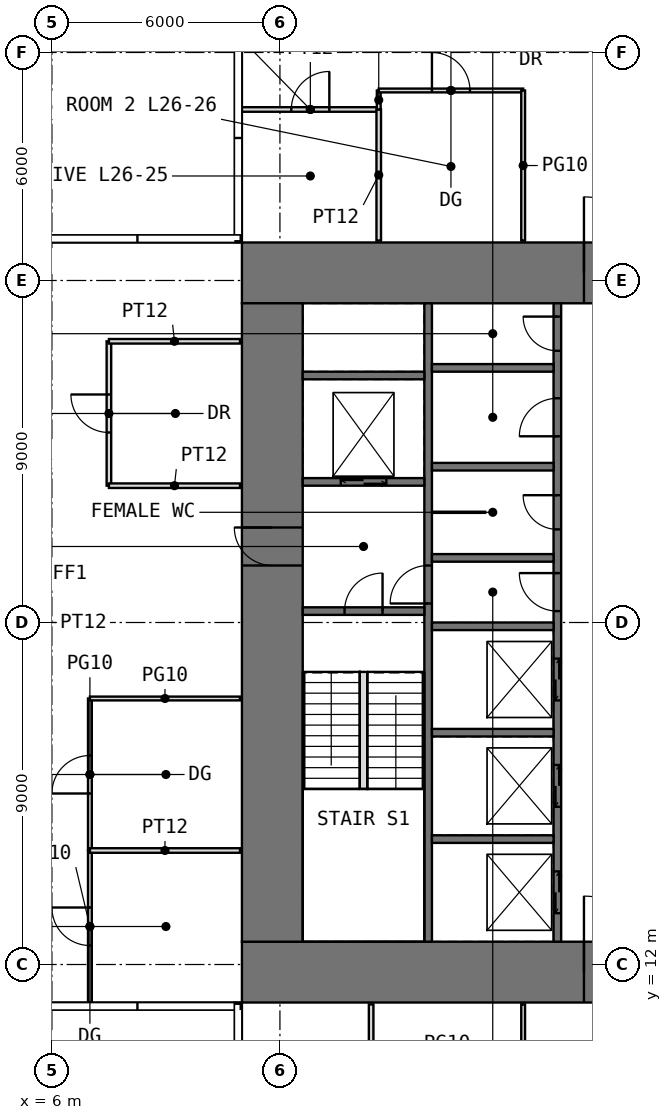
"""IFC4 building model, lengths in metres.
Left out: names, types, materials, properties, quantities, classifications, styles, units other than length and angle.
Written with IfcOpenShell. Run it as: python <this file> out.ifc"""

import sys

from ifc_helpers import new_model, si_unit, direction, frame, frame_2d, origin, place, context, subcontext, project, spatial, rectangle, extrude, element, fill, save


model = new_model("IFC4")
c1 = context("Model", 3, precision=1e-05, world=origin(), true_north=direction((0.0, 1.0)))
c2 = subcontext(c1, "Body", "Model", "MODEL_VIEW")
j1 = project(units=[si_unit("LENGTHUNIT", "METRE"), si_unit("PLANEANGLEUNIT", "RADIAN")], contexts=[c1])
p1 = place(None, origin())
s1 = spatial("IfcSite", under=j1, at=p1, CompositionType="ELEMENT")
p2 = place(p1, origin())
s2 = spatial("IfcBuilding", under=s1, at=p2, CompositionType="ELEMENT")
p3 = place(p2, frame((0.0, 0.0, 112.5)))
s3 = spatial("IfcBuildingStorey", under=s2, at=p3, CompositionType="ELEMENT", Elevation=112.5)
p4 = place(p3, frame((11.0, 11.8, -0.05), z_axis=(0.0, 0.0, 1.0), x_axis=(1.0, 0.0, 0.0)))
e1 = element("IfcWall", 1, at=p4, inside=s3, PredefinedType="SHEAR", context=c2, shape_type="SweptSolid", body=[
    extrude(rectangle(XDim=20.0, YDim=1.6, at=frame_2d((10.0, 0.0))), origin(), (0.0, 0.0, 1.0), 4.0),
])
p5 = place(p4, frame((9.0, 0.0, 0.05)))
e2 = element("IfcOpeningElement", 2, at=p5, cuts=e1, PredefinedType="OPENING", context=c2, shape_type="SweptSolid", body=[
    extrude(rectangle(XDim=2.0, YDim=2.2, at=frame_2d((1.0, 1.1))), frame((0.0, 0.81, 0.0), z_axis=(0.0, -1.0, 0.0), x_axis=(1.0, 0.0, 0.0)), (0.0, 0.0, 1.0), 1.62),
])
p6 = place(p3, frame((11.0, 30.2, -0.05), z_axis=(0.0, 0.0, 1.0), x_axis=(1.0, 0.0, 0.0)))
e3 = element("IfcWall", 3, at=p6, inside=s3, PredefinedType="SHEAR", context=c2, shape_type="SweptSolid", body=[
    extrude(rectangle(XDim=20.0, YDim=1.6, at=frame_2d((10.0, 0.0))), origin(), (0.0, 0.0, 1.0), 4.0),
])
p7 = place(p6, frame((9.0, 0.0, 0.05)))
e4 = element("IfcOpeningElement", 4, at=p7, cuts=e3, PredefinedType="OPENING", context=c2, shape_type="SweptSolid", body=[
    extrude(rectangle(XDim=2.0, YDim=2.2, at=frame_2d((1.0, 1.1))), frame((0.0, 0.81, 0.0), z_axis=(0.0, -1.0, 0.0), x_axis=(1.0, 0.0, 0.0)), (0.0, 0.0, 1.0), 1.62),
])
p8 = place(p3, frame((11.8, 12.6, -0.05), z_axis=(0.0, 0.0, 1.0), x_axis=(0.0, 1.0, 0.0)))
e5 = element("IfcWall", 5, at=p8, inside=s3, PredefinedType="SHEAR", context=c2, shape_type="SweptSolid", body=[
    extrude(rectangle(XDim=16.8, YDim=1.6, at=frame_2d((8.4, 0.0))), origin(), (0.0, 0.0, 1.0), 4.0),
])
p9 = place(p8, frame((9.9, 0.0, 0.05)))
e6 = element("IfcOpeningElement", 6, at=p9, cuts=e5, PredefinedType="OPENING", context=c2, shape_type="SweptSolid", body=[
    extrude(rectangle(XDim=1.0, YDim=2.2, at=frame_2d((0.5, 1.1))), frame((0.0, 0.81, 0.0), z_axis=(0.0, -1.0, 0.0), x_axis=(1.0, 0.0, 0.0)), (0.0, 0.0, 1.0), 1.62),
])
p10 = place(p3, frame((15.9, 12.6, -0.05), z_axis=(0.0, 0.0, 1.0), x_axis=(0.0, 1.0, 0.0)))
e7 = element("IfcWall", 7, at=p10, inside=s3, PredefinedType="SHEAR", context=c2, shape_type="SweptSolid", body=[
    extrude(rectangle(XDim=16.8, YDim=0.2, at=frame_2d((8.4, 0.0))), origin(), (0.0, 0.0, 1.0), 4.0),
])
p11 = place(p10, frame((8.9, 0.0, 0.05)))
e8 = element("IfcOpeningElement", 8, at=p11, cuts=e7, PredefinedType="OPENING", context=c2, shape_type="SweptSolid", body=[
    extrude(rectangle(XDim=1.0, YDim=2.2, at=frame_2d((0.5, 1.1))), frame((0.0, 0.11, 0.0), z_axis=(0.0, -1.0, 0.0), x_axis=(1.0, 0.0, 0.0)), (0.0, 0.0, 1.0), 0.22),
])
p12 = place(p3, frame((19.3, 12.6, -0.05), z_axis=(0.0, 0.0, 1.0), x_axis=(0.0, 1.0, 0.0)))
e9 = element("IfcWall", 9, at=p12, inside=s3, PredefinedType="SHEAR", context=c2, shape_type="SweptSolid", body=[
    extrude(rectangle(XDim=16.8, YDim=0.2, at=frame_2d((8.4, 0.0))), origin(), (0.0, 0.0, 1.0), 4.0),
])
p13 = place(p12, frame((8.7, 0.0, 0.05)))
e10 = element("IfcOpeningElement", 10, at=p13, cuts=e9, PredefinedType="OPENING", context=c2, shape_type="SweptSolid", body=[
    extrude(rectangle(XDim=1.0, YDim=2.2, at=frame_2d((0.5, 1.1))), frame((0.0, 0.11, 0.0), z_axis=(0.0, -1.0, 0.0), x_axis=(1.0, 0.0, 0.0)), (0.0, 0.0, 1.0), 0.22),
])
p14 = place(p12, frame((10.85, 0.0, 0.05)))
e11 = element("IfcOpeningElement", 11, at=p14, cuts=e9, PredefinedType="OPENING", context=c2, shape_type="SweptSolid", body=[
    extrude(rectangle(XDim=0.9, YDim=2.2, at=frame_2d((0.45, 1.1))), frame((0.0, 0.11, 0.0), z_axis=(0.0, -1.0, 0.0), x_axis=(1.0, 0.0, 0.0)), (0.0, 0.0, 1.0), 0.22),
])
p15 = place(p12, frame((13.3, 0.0, 0.05)))
e12 = element("IfcOpeningElement", 12, at=p15, cuts=e9, PredefinedType="OPENING", context=c2, shape_type="SweptSolid", body=[
    extrude(rectangle(XDim=1.0, YDim=2.2, at=frame_2d((0.5, 1.1))), frame((0.0, 0.11, 0.0), z_axis=(0.0, -1.0, 0.0), x_axis=(1.0, 0.0, 0.0)), (0.0, 0.0, 1.0), 0.22),
])
p16 = place(p12, frame((15.55, 0.0, 0.05)))
e13 = element("IfcOpeningElement", 13, at=p16, cuts=e9, PredefinedType="OPENING", context=c2, shape_type="SweptSolid", body=[
    extrude(rectangle(XDim=0.9, YDim=2.2, at=frame_2d((0.45, 1.1))), frame((0.0, 0.11, 0.0), z_axis=(0.0, -1.0, 0.0), x_axis=(1.0, 0.0, 0.0)), (0.0, 0.0, 1.0), 0.22),
])
p17 = place(p12, frame((0.75, 0.0, 0.05)))
e14 = element("IfcOpeningElement", 14, at=p17, cuts=e9, PredefinedType="OPENING", context=c2, shape_type="SweptSolid", body=[
    extrude(rectangle(XDim=1.1, YDim=2.2, at=frame_2d((0.55, 1.1))), frame((0.0, 0.11, 0.0), z_axis=(0.0, -1.0, 0.0), x_axis=(1.0, 0.0, 0.0)), (0.0, 0.0, 1.0), 0.22),
])
p18 = place(p12, frame((3.55, 0.0, 0.05)))
e15 = element("IfcOpeningElement", 15, at=p18, cuts=e9, PredefinedType="OPENING", context=c2, shape_type="SweptSolid", body=[
    extrude(rectangle(XDim=1.1, YDim=2.2, at=frame_2d((0.55, 1.1))), frame((0.0, 0.11, 0.0), z_axis=(0.0, -1.0, 0.0), x_axis=(1.0, 0.0, 0.0)), (0.0, 0.0, 1.0), 0.22),
])
p19 = place(p12, frame((6.35, 0.0, 0.05)))
e16 = element("IfcOpeningElement", 16, at=p19, cuts=e9, PredefinedType="OPENING", context=c2, shape_type="SweptSolid", body=[
    extrude(rectangle(XDim=1.1, YDim=2.2, at=frame_2d((0.55, 1.1))), frame((0.0, 0.11, 0.0), z_axis=(0.0, -1.0, 0.0), x_axis=(1.0, 0.0, 0.0)), (0.0, 0.0, 1.0), 0.22),
])
p20 = place(p3, frame((12.6, 21.3, -0.05), z_axis=(0.0, 0.0, 1.0), x_axis=(1.0, 0.0, 0.0)))
e17 = element("IfcWall", 17, at=p20, inside=s3, PredefinedType="SHEAR", context=c2, shape_type="SweptSolid", body=[
    extrude(rectangle(XDim=3.2, YDim=0.2, at=frame_2d((1.6, 0.0))), origin(), (0.0, 0.0, 1.0), 4.0),
])
p21 = place(p20, frame((1.1, 0.0, 0.05)))
e18 = element("IfcOpeningElement", 18, at=p21, cuts=e17, PredefinedType="OPENING", context=c2, shape_type="SweptSolid", body=[
    extrude(rectangle(XDim=1.0, YDim=2.2, at=frame_2d((0.5, 1.1))), frame((0.0, 0.11, 0.0), z_axis=(0.0, -1.0, 0.0), x_axis=(1.0, 0.0, 0.0)), (0.0, 0.0, 1.0), 0.22),
])
p22 = place(p3, frame((12.6, 24.7, -0.05), z_axis=(0.0, 0.0, 1.0), x_axis=(1.0, 0.0, 0.0)))
e19 = element("IfcWall", 19, at=p22, inside=s3, PredefinedType="SHEAR", context=c2, shape_type="SweptSolid", body=[
    extrude(rectangle(XDim=3.2, YDim=0.2, at=frame_2d((1.6, 0.0))), origin(), (0.0, 0.0, 1.0), 4.0),
])
p23 = place(p22, frame((1.0, 0.0, 0.05)))
e20 = element("IfcOpeningElement", 20, at=p23, cuts=e19, PredefinedType="OPENING", context=c2, shape_type="SweptSolid", body=[
    extrude(rectangle(XDim=1.2, YDim=2.2, at=frame_2d((0.6, 1.1))), frame((0.0, 0.11, 0.0), z_axis=(0.0, -1.0, 0.0), x_axis=(1.0, 0.0, 0.0)), (0.0, 0.0, 1.0), 0.22),
])
for number, where, z_axis, x_axis in (
    (21, (12.6, 27.5, -0.05), (0.0, 0.0, 1.0), (1.0, 0.0, 0.0)),
    (22, (16.0, 15.3, -0.05), (0.0, 0.0, 1.0), (1.0, 0.0, 0.0)),
    (23, (16.0, 18.1, -0.05), (0.0, 0.0, 1.0), (1.0, 0.0, 0.0)),
    (24, (16.0, 20.9, -0.05), (0.0, 0.0, 1.0), (1.0, 0.0, 0.0)),
    (25, (16.0, 22.7, -0.05), (0.0, 0.0, 1.0), (1.0, 0.0, 0.0)),
    (26, (16.0, 25.1, -0.05), (0.0, 0.0, 1.0), (1.0, 0.0, 0.0)),
    (27, (16.0, 27.7, -0.05), (0.0, 0.0, 1.0), (1.0, 0.0, 0.0)),
):
    element("IfcWall", number, at=place(p3, frame(where, z_axis=z_axis, x_axis=x_axis)), inside=s3, PredefinedType="SHEAR", context=c2, shape_type="SweptSolid", body=[
        extrude(rectangle(XDim=3.2, YDim=0.2, at=frame_2d((1.6, 0.0))), origin(), (0.0, 0.0, 1.0), 4.0),
    ])
p24 = place(p3, frame((16.0, 23.9, 0.0), z_axis=(0.0, 0.0, 1.0), x_axis=(1.0, 0.0, 0.0)))
e28 = element("IfcWall", 28, at=p24, inside=s3, PredefinedType="PARTITIONING", context=c2, shape_type="SweptSolid", body=[
    extrude(rectangle(XDim=1.4, YDim=0.03, at=frame_2d((0.7, 0.0))), origin(), (0.0, 0.0, 1.0), 3.75),
])
p25 = place(p3, frame((7.0, 11.0, 0.0), z_axis=(0.0, 0.0, 1.0), x_axis=(0.0, 1.0, 0.0)))
e29 = element("IfcWall", 29, at=p25, inside=s3, PredefinedType="PARTITIONING", context=c2, shape_type="SweptSolid", body=[
    extrude(rectangle(XDim=4.0, YDim=0.1, at=frame_2d((2.0, 0.0))), origin(), (0.0, 0.0, 1.0), 3.75),
])
p26 = place(p25, frame((1.5, 0.0, 0.0)))
e30 = element("IfcOpeningElement", 30, at=p26, cuts=e29, PredefinedType="OPENING", context=c2, shape_type="SweptSolid", body=[
    extrude(rectangle(XDim=1.0, YDim=2.4, at=frame_2d((0.5, 1.2))), frame((0.0, 0.06, 0.0), z_axis=(0.0, -1.0, 0.0), x_axis=(1.0, 0.0, 0.0)), (0.0, 0.0, 1.0), 0.12),
])
p27 = place(p3, frame((7.0, 15.0, 0.0), z_axis=(0.0, 0.0, 1.0), x_axis=(0.0, 1.0, 0.0)))
e31 = element("IfcWall", 31, at=p27, inside=s3, PredefinedType="PARTITIONING", context=c2, shape_type="SweptSolid", body=[
    extrude(rectangle(XDim=4.0, YDim=0.1, at=frame_2d((2.0, 0.0))), origin(), (0.0, 0.0, 1.0), 3.75),
])
p28 = place(p27, frame((1.5, 0.0, 0.0)))
e32 = element("IfcOpeningElement", 32, at=p28, cuts=e31, PredefinedType="OPENING", context=c2, shape_type="SweptSolid", body=[
    extrude(rectangle(XDim=1.0, YDim=2.4, at=frame_2d((0.5, 1.2))), frame((0.0, 0.06, 0.0), z_axis=(0.0, -1.0, 0.0), x_axis=(1.0, 0.0, 0.0)), (0.0, 0.0, 1.0), 0.12),
])
p29 = place(p3, frame((7.0, 15.0, 0.0), z_axis=(0.0, 0.0, 1.0), x_axis=(1.0, 0.0, 0.0)))
e33 = element("IfcWall", 33, at=p29, inside=s3, PredefinedType="PARTITIONING", context=c2, shape_type="SweptSolid", body=[
    extrude(rectangle(XDim=3.95, YDim=0.12, at=frame_2d((1.975, 0.0))), origin(), (0.0, 0.0, 1.0), 3.75),
])
p30 = place(p3, frame((7.0, 19.0, 0.0), z_axis=(0.0, 0.0, 1.0), x_axis=(1.0, 0.0, 0.0)))
e34 = element("IfcWall", 34, at=p30, inside=s3, PredefinedType="PARTITIONING", context=c2, shape_type="SweptSolid", body=[
    extrude(rectangle(XDim=3.95, YDim=0.1, at=frame_2d((1.975, 0.0))), origin(), (0.0, 0.0, 1.0), 3.75),
])
p31 = place(p3, frame((7.5, 24.6, 0.0), z_axis=(0.0, 0.0, 1.0), x_axis=(0.0, 1.0, 0.0)))
e35 = element("IfcWall", 35, at=p31, inside=s3, PredefinedType="PARTITIONING", context=c2, shape_type="SweptSolid", body=[
    extrude(rectangle(XDim=3.8, YDim=0.12, at=frame_2d((1.9, 0.0))), origin(), (0.0, 0.0, 1.0), 3.75),
])
p32 = place(p31, frame((1.4, 0.0, 0.0)))
e36 = element("IfcOpeningElement", 36, at=p32, cuts=e35, PredefinedType="OPENING", context=c2, shape_type="SweptSolid", body=[
    extrude(rectangle(XDim=1.0, YDim=2.2, at=frame_2d((0.5, 1.1))), frame((0.0, 0.07, 0.0), z_axis=(0.0, -1.0, 0.0), x_axis=(1.0, 0.0, 0.0)), (0.0, 0.0, 1.0), 0.14),
])
for number, where, z_axis, x_axis in (
    (37, (7.5, 24.6, 0.0), (0.0, 0.0, 1.0), (1.0, 0.0, 0.0)),
    (38, (7.5, 28.4, 0.0), (0.0, 0.0, 1.0), (1.0, 0.0, 0.0)),
):
    element("IfcWall", number, at=place(p3, frame(where, z_axis=z_axis, x_axis=x_axis)), inside=s3, PredefinedType="PARTITIONING", context=c2, shape_type="SweptSolid", body=[
        extrude(rectangle(XDim=3.45, YDim=0.12, at=frame_2d((1.725, 0.0))), origin(), (0.0, 0.0, 1.0), 3.75),
    ])
p33 = place(p3, frame((11.0, 34.5, 0.0), z_axis=(0.0, 0.0, 1.0), x_axis=(1.0, 0.0, 0.0)))
e39 = element("IfcWall", 39, at=p33, inside=s3, PredefinedType="PARTITIONING", context=c2, shape_type="SweptSolid", body=[
    extrude(rectangle(XDim=3.6, YDim=0.12, at=frame_2d((1.8, 0.0))), origin(), (0.0, 0.0, 1.0), 3.75),
])
p34 = place(p33, frame((1.3, 0.0, 0.0)))
e40 = element("IfcOpeningElement", 40, at=p34, cuts=e39, PredefinedType="OPENING", context=c2, shape_type="SweptSolid", body=[
    extrude(rectangle(XDim=1.0, YDim=2.2, at=frame_2d((0.5, 1.1))), frame((0.0, 0.07, 0.0), z_axis=(0.0, -1.0, 0.0), x_axis=(1.0, 0.0, 0.0)), (0.0, 0.0, 1.0), 0.14),
])
p35 = place(p3, frame((14.4, 7.0, 0.0), z_axis=(0.0, 0.0, 1.0), x_axis=(0.0, 1.0, 0.0)))
e41 = element("IfcWall", 41, at=p35, inside=s3, PredefinedType="PARTITIONING", context=c2, shape_type="SweptSolid", body=[
    extrude(rectangle(XDim=3.95, YDim=0.12, at=frame_2d((1.975, 0.0))), origin(), (0.0, 0.0, 1.0), 3.75),
])
p36 = place(p3, frame((14.6, 31.05, 0.0), z_axis=(0.0, 0.0, 1.0), x_axis=(0.0, 1.0, 0.0)))
e42 = element("IfcWall", 42, at=p36, inside=s3, PredefinedType="PARTITIONING", context=c2, shape_type="SweptSolid", body=[
    extrude(rectangle(XDim=3.45, YDim=0.12, at=frame_2d((1.725, 0.0))), origin(), (0.0, 0.0, 1.0), 3.75),
])
p37 = place(p3, frame((14.6, 34.5, 0.0), z_axis=(0.0, 0.0, 1.0), x_axis=(0.0, 1.0, 0.0)))
e43 = element("IfcWall", 43, at=p37, inside=s3, PredefinedType="PARTITIONING", context=c2, shape_type="SweptSolid", body=[
    extrude(rectangle(XDim=0.5, YDim=0.1, at=frame_2d((0.25, 0.0))), origin(), (0.0, 0.0, 1.0), 3.75),
])
p38 = place(p3, frame((14.6, 35.0, 0.0), z_axis=(0.0, 0.0, 1.0), x_axis=(1.0, 0.0, 0.0)))
e44 = element("IfcWall", 44, at=p38, inside=s3, PredefinedType="PARTITIONING", context=c2, shape_type="SweptSolid", body=[
    extrude(rectangle(XDim=3.8, YDim=0.1, at=frame_2d((1.9, 0.0))), origin(), (0.0, 0.0, 1.0), 3.75),
])
p39 = place(p38, frame((1.4, 0.0, 0.0)))
e45 = element("IfcOpeningElement", 45, at=p39, cuts=e44, PredefinedType="OPENING", context=c2, shape_type="SweptSolid", body=[
    extrude(rectangle(XDim=1.0, YDim=2.4, at=frame_2d((0.5, 1.2))), frame((0.0, 0.06, 0.0), z_axis=(0.0, -1.0, 0.0), x_axis=(1.0, 0.0, 0.0)), (0.0, 0.0, 1.0), 0.12),
])
for number, where, z_axis, x_axis in (
    (46, (18.4, 7.0, 0.0), (0.0, 0.0, 1.0), (0.0, 1.0, 0.0)),
    (47, (18.4, 31.05, 0.0), (0.0, 0.0, 1.0), (0.0, 1.0, 0.0)),
):
    element("IfcWall", number, at=place(p3, frame(where, z_axis=z_axis, x_axis=x_axis)), inside=s3, PredefinedType="PARTITIONING", context=c2, shape_type="SweptSolid", body=[
        extrude(rectangle(XDim=3.95, YDim=0.1, at=frame_2d((1.975, 0.0))), origin(), (0.0, 0.0, 1.0), 3.75),
    ])
p40 = place(p3, frame((14.2, 16.62, 0.0), z_axis=(0.0, 0.0, 1.0), x_axis=(0.0, 1.0, 0.0)))
e48 = element("IfcWall", 48, at=p40, inside=s3, PredefinedType="PARTITIONING", context=c2, shape_type="SweptSolid", body=[
    extrude(rectangle(XDim=3.08, YDim=0.2, at=frame_2d((1.54, 0.0))), origin(), (0.0, 0.0, 1.0), 4.0),
])
p41 = place(p5, origin())
e49 = element("IfcDoor", 49, at=p41, inside=s3, OperationType="DOUBLE_DOOR_SINGLE_SWING", PredefinedType="DOOR", context=c2, shape_type="SweptSolid", body=[
    extrude(rectangle(XDim=2.0, YDim=2.2, at=frame_2d((1.0, 1.1))), frame((0.0, 0.025, 0.0), z_axis=(0.0, -1.0, 0.0), x_axis=(1.0, 0.0, 0.0)), (0.0, 0.0, 1.0), 0.05),
])
fill(e2, e49)
p42 = place(p7, origin())
e50 = element("IfcDoor", 50, at=p42, inside=s3, OperationType="DOUBLE_DOOR_SINGLE_SWING", PredefinedType="DOOR", context=c2, shape_type="SweptSolid", body=[
    extrude(rectangle(XDim=2.0, YDim=2.2, at=frame_2d((1.0, 1.1))), frame((0.0, 0.025, 0.0), z_axis=(0.0, -1.0, 0.0), x_axis=(1.0, 0.0, 0.0)), (0.0, 0.0, 1.0), 0.05),
])
fill(e4, e50)
p43 = place(p9, origin())
e51 = element("IfcDoor", 51, at=p43, inside=s3, OperationType="SINGLE_SWING_RIGHT", PredefinedType="DOOR", context=c2, shape_type="SweptSolid", body=[
    extrude(rectangle(XDim=1.0, YDim=2.2, at=frame_2d((0.5, 1.1))), frame((0.0, 0.025, 0.0), z_axis=(0.0, -1.0, 0.0), x_axis=(1.0, 0.0, 0.0)), (0.0, 0.0, 1.0), 0.05),
])
fill(e6, e51)
p44 = place(p21, origin())
e52 = element("IfcDoor", 52, at=p44, inside=s3, OperationType="SINGLE_SWING_RIGHT", PredefinedType="DOOR", context=c2, shape_type="SweptSolid", body=[
    extrude(rectangle(XDim=1.0, YDim=2.2, at=frame_2d((0.5, 1.1))), frame((0.0, 0.025, 0.0), z_axis=(0.0, -1.0, 0.0), x_axis=(1.0, 0.0, 0.0)), (0.0, 0.0, 1.0), 0.05),
])
fill(e18, e52)
p45 = place(p11, origin())
e53 = element("IfcDoor", 53, at=p45, inside=s3, OperationType="SINGLE_SWING_LEFT", PredefinedType="DOOR", context=c2, shape_type="SweptSolid", body=[
    extrude(rectangle(XDim=1.0, YDim=2.2, at=frame_2d((0.5, 1.1))), frame((0.0, 0.025, 0.0), z_axis=(0.0, -1.0, 0.0), x_axis=(1.0, 0.0, 0.0)), (0.0, 0.0, 1.0), 0.05),
])
fill(e8, e53)
p46 = place(p13, origin())
e54 = element("IfcDoor", 54, at=p46, inside=s3, OperationType="SINGLE_SWING_RIGHT", PredefinedType="DOOR", context=c2, shape_type="SweptSolid", body=[
    extrude(rectangle(XDim=1.0, YDim=2.2, at=frame_2d((0.5, 1.1))), frame((0.0, 0.025, 0.0), z_axis=(0.0, -1.0, 0.0), x_axis=(1.0, 0.0, 0.0)), (0.0, 0.0, 1.0), 0.05),
])
fill(e10, e54)
p47 = place(p14, origin())
e55 = element("IfcDoor", 55, at=p47, inside=s3, OperationType="SINGLE_SWING_RIGHT", PredefinedType="DOOR", context=c2, shape_type="SweptSolid", body=[
    extrude(rectangle(XDim=0.9, YDim=2.2, at=frame_2d((0.45, 1.1))), frame((0.0, 0.025, 0.0), z_axis=(0.0, -1.0, 0.0), x_axis=(1.0, 0.0, 0.0)), (0.0, 0.0, 1.0), 0.05),
])
fill(e11, e55)
p48 = place(p15, origin())
e56 = element("IfcDoor", 56, at=p48, inside=s3, OperationType="SINGLE_SWING_LEFT", PredefinedType="DOOR", context=c2, shape_type="SweptSolid", body=[
    extrude(rectangle(XDim=1.0, YDim=2.2, at=frame_2d((0.5, 1.1))), frame((0.0, 0.025, 0.0), z_axis=(0.0, -1.0, 0.0), x_axis=(1.0, 0.0, 0.0)), (0.0, 0.0, 1.0), 0.05),
])
fill(e12, e56)
p49 = place(p16, origin())
e57 = element("IfcDoor", 57, at=p49, inside=s3, OperationType="SINGLE_SWING_RIGHT", PredefinedType="DOOR", context=c2, shape_type="SweptSolid", body=[
    extrude(rectangle(XDim=0.9, YDim=2.2, at=frame_2d((0.45, 1.1))), frame((0.0, 0.025, 0.0), z_axis=(0.0, -1.0, 0.0), x_axis=(1.0, 0.0, 0.0)), (0.0, 0.0, 1.0), 0.05),
])
fill(e13, e57)
p50 = place(p34, origin())
e58 = element("IfcDoor", 58, at=p50, inside=s3, OperationType="SINGLE_SWING_RIGHT", PredefinedType="DOOR", context=c2, shape_type="SweptSolid", body=[
    extrude(rectangle(XDim=1.0, YDim=2.2, at=frame_2d((0.5, 1.1))), frame((0.0, 0.025, 0.0), z_axis=(0.0, -1.0, 0.0), x_axis=(1.0, 0.0, 0.0)), (0.0, 0.0, 1.0), 0.05),
])
fill(e40, e58)
p51 = place(p39, origin())
e59 = element("IfcDoor", 59, at=p51, inside=s3, OperationType="SINGLE_SWING_LEFT", PredefinedType="DOOR", context=c2, shape_type="SweptSolid", body=[
    extrude(rectangle(XDim=1.0, YDim=2.4, at=frame_2d((0.5, 1.2))), frame((0.0, 0.025, 0.0), z_axis=(0.0, -1.0, 0.0), x_axis=(1.0, 0.0, 0.0)), (0.0, 0.0, 1.0), 0.05),
])
fill(e45, e59)
p52 = place(p26, origin())
e60 = element("IfcDoor", 60, at=p52, inside=s3, OperationType="SINGLE_SWING_RIGHT", PredefinedType="DOOR", context=c2, shape_type="SweptSolid", body=[
    extrude(rectangle(XDim=1.0, YDim=2.4, at=frame_2d((0.5, 1.2))), frame((0.0, 0.025, 0.0), z_axis=(0.0, -1.0, 0.0), x_axis=(1.0, 0.0, 0.0)), (0.0, 0.0, 1.0), 0.05),
])
fill(e30, e60)
p53 = place(p28, origin())
e61 = element("IfcDoor", 61, at=p53, inside=s3, OperationType="SINGLE_SWING_LEFT", PredefinedType="DOOR", context=c2, shape_type="SweptSolid", body=[
    extrude(rectangle(XDim=1.0, YDim=2.4, at=frame_2d((0.5, 1.2))), frame((0.0, 0.025, 0.0), z_axis=(0.0, -1.0, 0.0), x_axis=(1.0, 0.0, 0.0)), (0.0, 0.0, 1.0), 0.05),
])
fill(e32, e61)
p54 = place(p32, origin())
e62 = element("IfcDoor", 62, at=p54, inside=s3, OperationType="SINGLE_SWING_RIGHT", PredefinedType="DOOR", context=c2, shape_type="SweptSolid", body=[
    extrude(rectangle(XDim=1.0, YDim=2.2, at=frame_2d((0.5, 1.1))), frame((0.0, 0.025, 0.0), z_axis=(0.0, -1.0, 0.0), x_axis=(1.0, 0.0, 0.0)), (0.0, 0.0, 1.0), 0.05),
])
fill(e36, e62)
p55 = place(p17, origin())
e63 = element("IfcDoor", 63, at=p55, inside=s3, OperationType="DOUBLE_DOOR_SLIDING", PredefinedType="DOOR", context=c2, shape_type="SweptSolid", body=[
    extrude(rectangle(XDim=1.1, YDim=2.2, at=frame_2d((0.55, 1.1))), frame((0.0, 0.025, 0.0), z_axis=(0.0, -1.0, 0.0), x_axis=(1.0, 0.0, 0.0)), (0.0, 0.0, 1.0), 0.05),
])
fill(e14, e63)
p56 = place(p18, origin())
e64 = element("IfcDoor", 64, at=p56, inside=s3, OperationType="DOUBLE_DOOR_SLIDING", PredefinedType="DOOR", context=c2, shape_type="SweptSolid", body=[
    extrude(rectangle(XDim=1.1, YDim=2.2, at=frame_2d((0.55, 1.1))), frame((0.0, 0.025, 0.0), z_axis=(0.0, -1.0, 0.0), x_axis=(1.0, 0.0, 0.0)), (0.0, 0.0, 1.0), 0.05),
])
fill(e15, e64)
p57 = place(p19, origin())
e65 = element("IfcDoor", 65, at=p57, inside=s3, OperationType="DOUBLE_DOOR_SLIDING", PredefinedType="DOOR", context=c2, shape_type="SweptSolid", body=[
    extrude(rectangle(XDim=1.1, YDim=2.2, at=frame_2d((0.55, 1.1))), frame((0.0, 0.025, 0.0), z_axis=(0.0, -1.0, 0.0), x_axis=(1.0, 0.0, 0.0)), (0.0, 0.0, 1.0), 0.05),
])
fill(e16, e65)
p58 = place(p23, origin())
e66 = element("IfcDoor", 66, at=p58, inside=s3, OperationType="DOUBLE_DOOR_SLIDING", PredefinedType="DOOR", context=c2, shape_type="SweptSolid", body=[
    extrude(rectangle(XDim=1.2, YDim=2.2, at=frame_2d((0.6, 1.1))), frame((0.0, 0.025, 0.0), z_axis=(0.0, -1.0, 0.0), x_axis=(1.0, 0.0, 0.0)), (0.0, 0.0, 1.0), 0.05),
])
fill(e20, e66)
save(model, sys.argv[1])
